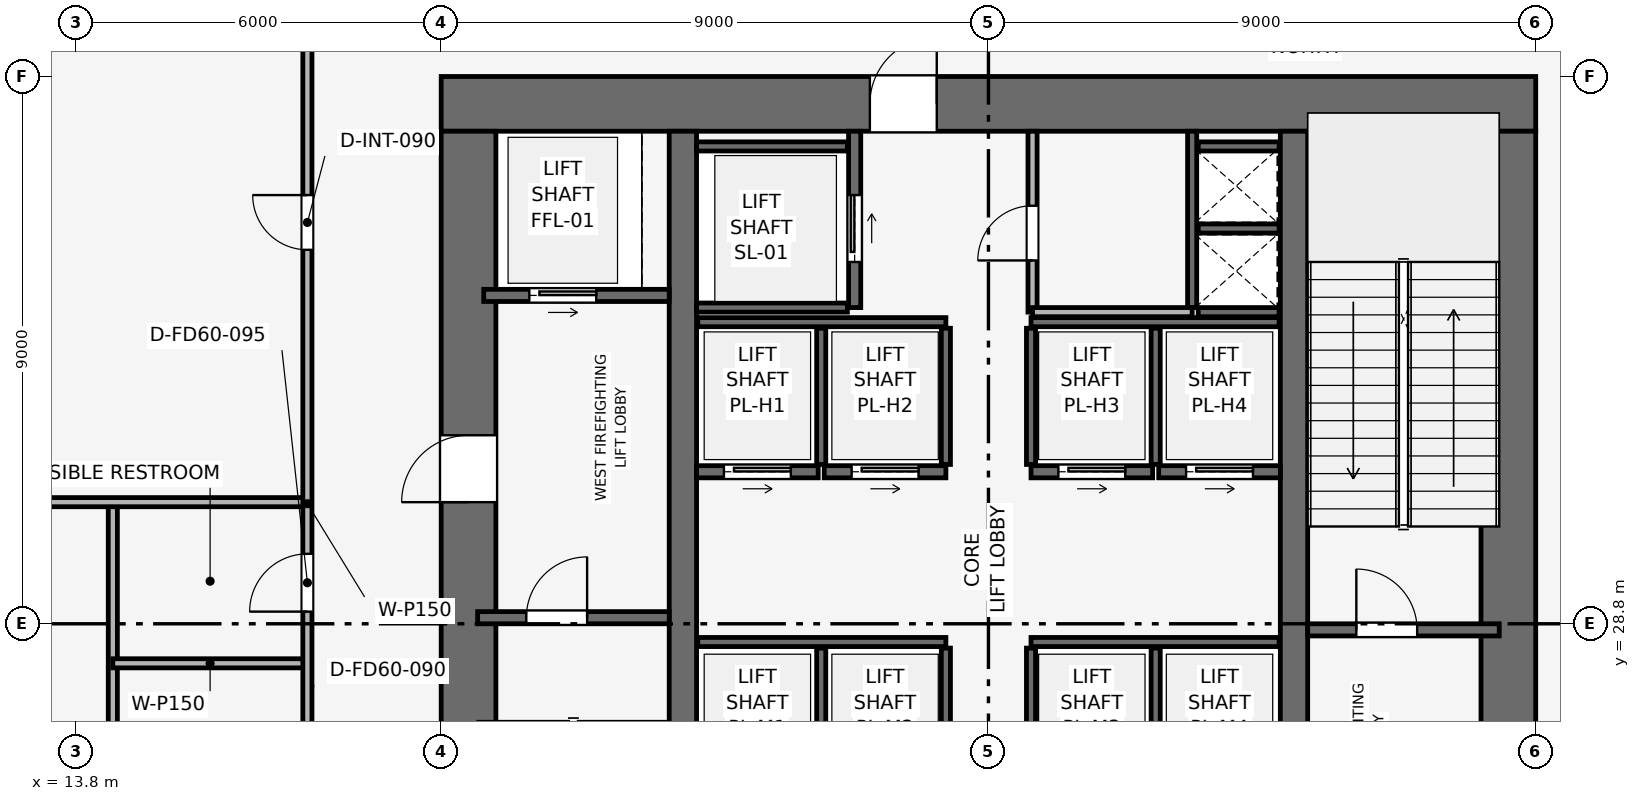
"""IFC4 building model, lengths in metres.
Left out: names, types, materials, properties, quantities, classifications, styles, units other than length and angle.
Written with IfcOpenShell. Run it as: python <this file> out.ifc"""

import sys

from ifc_helpers import new_model, si_unit, direction, frame, frame_2d, origin, place, context, subcontext, project, spatial, rectangle, extrude, element, fill, save


model = new_model("IFC4")
c1 = context("Model", 3, precision=1e-05, world=origin(), true_north=direction((0.0, 1.0)))
c2 = subcontext(c1, "Body", "Model", "MODEL_VIEW")
j1 = project(units=[si_unit("LENGTHUNIT", "METRE"), si_unit("PLANEANGLEUNIT", "RADIAN")], contexts=[c1])
p1 = place(None, origin())
s1 = spatial("IfcSite", under=j1, at=p1, CompositionType="ELEMENT")
p2 = place(p1, origin())
s2 = spatial("IfcBuilding", under=s1, at=p2, CompositionType="ELEMENT")
p3 = place(p2, frame((0.0, 0.0, 132.9)))
s3 = spatial("IfcBuildingStorey", under=s2, at=p3, CompositionType="ELEMENT", Elevation=132.9)
p4 = place(p3, frame((19.8, 37.35, 0.0), z_axis=(0.0, 0.0, 1.0), x_axis=(1.0, 0.0, 0.0)))
e1 = element("IfcWall", 1, at=p4, inside=s3, PredefinedType="SHEAR", context=c2, shape_type="SweptSolid", body=[
    extrude(rectangle(XDim=18.0, YDim=0.9, at=frame_2d((9.0, 0.0))), origin(), (0.0, 0.0, 1.0), 5.4),
])
p5 = place(p4, frame((7.05, 0.0, 0.0)))
e2 = element("IfcOpeningElement", 2, at=p5, cuts=e1, PredefinedType="OPENING", context=c2, shape_type="SweptSolid", body=[
    extrude(rectangle(XDim=1.1, YDim=2.15, at=frame_2d((0.55, 1.075))), frame((0.0, 0.46, 0.0), z_axis=(0.0, -1.0, 0.0), x_axis=(1.0, 0.0, 0.0)), (0.0, 0.0, 1.0), 0.92),
])
p6 = place(p3, frame((20.25, 20.7, 0.0), z_axis=(0.0, 0.0, 1.0), x_axis=(0.0, 1.0, 0.0)))
e3 = element("IfcWall", 3, at=p6, inside=s3, PredefinedType="SHEAR", context=c2, shape_type="SweptSolid", body=[
    extrude(rectangle(XDim=16.2, YDim=0.9, at=frame_2d((8.1, 0.0))), origin(), (0.0, 0.0, 1.0), 5.4),
])
p7 = place(p6, frame((10.1, 0.0, 0.0)))
e4 = element("IfcOpeningElement", 4, at=p7, cuts=e3, PredefinedType="OPENING", context=c2, shape_type="SweptSolid", body=[
    extrude(rectangle(XDim=1.1, YDim=2.15, at=frame_2d((0.55, 1.075))), frame((0.0, 0.46, 0.0), z_axis=(0.0, -1.0, 0.0), x_axis=(1.0, 0.0, 0.0)), (0.0, 0.0, 1.0), 0.92),
])
p8 = place(p3, frame((37.35, 20.7, 0.0), z_axis=(0.0, 0.0, 1.0), x_axis=(0.0, 1.0, 0.0)))
e5 = element("IfcWall", 5, at=p8, inside=s3, PredefinedType="SHEAR", context=c2, shape_type="SweptSolid", body=[
    extrude(rectangle(XDim=16.2, YDim=0.9, at=frame_2d((8.1, 0.0))), origin(), (0.0, 0.0, 1.0), 5.4),
])
p9 = place(p8, frame((4.6, 0.0, 0.0)))
e6 = element("IfcOpeningElement", 6, at=p9, cuts=e5, PredefinedType="OPENING", context=c2, shape_type="SweptSolid", body=[
    extrude(rectangle(XDim=1.1, YDim=2.15, at=frame_2d((0.55, 1.075))), frame((0.0, 0.46, 0.0), z_axis=(0.0, -1.0, 0.0), x_axis=(1.0, 0.0, 0.0)), (0.0, 0.0, 1.0), 0.92),
])
for number, where, z_axis, x_axis in (
    (7, (23.775, 20.7, 0.0), (0.0, 0.0, 1.0), (0.0, 1.0, 0.0)),
    (8, (33.825, 20.7, 0.0), (0.0, 0.0, 1.0), (0.0, 1.0, 0.0)),
):
    element("IfcWall", number, at=place(p3, frame(where, z_axis=z_axis, x_axis=x_axis)), inside=s3, PredefinedType="SHEAR", context=c2, shape_type="SweptSolid", body=[
        extrude(rectangle(XDim=16.2, YDim=0.45, at=frame_2d((8.1, 0.0))), origin(), (0.0, 0.0, 1.0), 5.4),
    ])
p10 = place(p3, frame((20.4, 28.9, 0.0), z_axis=(0.0, 0.0, 1.0), x_axis=(1.0, 0.0, 0.0)))
e9 = element("IfcWall", 9, at=p10, inside=s3, PredefinedType="SHEAR", context=c2, shape_type="SweptSolid", body=[
    extrude(rectangle(XDim=3.15, YDim=0.2, at=frame_2d((1.575, 0.0))), origin(), (0.0, 0.0, 1.0), 5.145),
])
p11 = place(p10, frame((0.8, 0.0, 0.0)))
e10 = element("IfcOpeningElement", 10, at=p11, cuts=e9, PredefinedType="OPENING", context=c2, shape_type="SweptSolid", body=[
    extrude(rectangle(XDim=1.0, YDim=2.1, at=frame_2d((0.5, 1.05))), frame((0.0, 0.11, 0.0), z_axis=(0.0, -1.0, 0.0), x_axis=(1.0, 0.0, 0.0)), (0.0, 0.0, 1.0), 0.22),
])
p12 = place(p3, frame((34.05, 28.7, 0.0), z_axis=(0.0, 0.0, 1.0), x_axis=(1.0, 0.0, 0.0)))
e11 = element("IfcWall", 11, at=p12, inside=s3, PredefinedType="SHEAR", context=c2, shape_type="SweptSolid", body=[
    extrude(rectangle(XDim=3.15, YDim=0.2, at=frame_2d((1.575, 0.0))), origin(), (0.0, 0.0, 1.0), 5.145),
])
p13 = place(p12, frame((0.8, 0.0, 0.0)))
e12 = element("IfcOpeningElement", 12, at=p13, cuts=e11, PredefinedType="OPENING", context=c2, shape_type="SweptSolid", body=[
    extrude(rectangle(XDim=1.0, YDim=2.1, at=frame_2d((0.5, 1.05))), frame((0.0, 0.11, 0.0), z_axis=(0.0, -1.0, 0.0), x_axis=(1.0, 0.0, 0.0)), (0.0, 0.0, 1.0), 0.22),
])
p14 = place(p3, frame((32.15, 34.0, 0.0), z_axis=(0.0, 0.0, 1.0), x_axis=(0.0, 1.0, 0.0)))
e13 = element("IfcWall", 13, at=p14, inside=s3, PredefinedType="SHEAR", context=c2, shape_type="SweptSolid", body=[
    extrude(rectangle(XDim=2.9, YDim=0.15, at=frame_2d((1.45, 0.0))), origin(), (0.0, 0.0, 1.0), 5.145),
])
for number, where, z_axis, x_axis in (
    (14, (32.25, 33.925, 0.0), (0.0, 0.0, 1.0), (1.0, 0.0, 0.0)),
    (15, (32.25, 35.3, 0.0), (0.0, 0.0, 1.0), (1.0, 0.0, 0.0)),
):
    element("IfcWall", number, at=place(p3, frame(where, z_axis=z_axis, x_axis=x_axis)), inside=s3, PredefinedType="SHEAR", context=c2, shape_type="SweptSolid", body=[
        extrude(rectangle(XDim=1.33, YDim=0.15, at=frame_2d((0.665, 0.0))), origin(), (0.0, 0.0, 1.0), 5.145),
    ])
p15 = place(p3, frame((20.5, 34.2, 0.0), z_axis=(0.0, 0.0, 1.0), x_axis=(1.0, 0.0, 0.0)))
e16 = element("IfcWall", 16, at=p15, inside=s3, PredefinedType="SHEAR", context=c2, shape_type="SweptSolid", body=[
    extrude(rectangle(XDim=3.05, YDim=0.2, at=frame_2d((1.525, 0.0))), origin(), (0.0, 0.0, 1.0), 5.145),
])
p16 = place(p15, frame((0.75, 0.0, 0.0)))
e17 = element("IfcOpeningElement", 17, at=p16, cuts=e16, PredefinedType="OPENING", context=c2, shape_type="SweptSolid", body=[
    extrude(rectangle(XDim=1.1, YDim=2.15, at=frame_2d((0.55, 1.075))), frame((0.0, 0.11, 0.0), z_axis=(0.0, -1.0, 0.0), x_axis=(1.0, 0.0, 0.0)), (0.0, 0.0, 1.0), 0.22),
])
p17 = place(p3, frame((26.6, 34.0, 0.0), z_axis=(0.0, 0.0, 1.0), x_axis=(0.0, 1.0, 0.0)))
e18 = element("IfcWall", 18, at=p17, inside=s3, PredefinedType="SHEAR", context=c2, shape_type="SweptSolid", body=[
    extrude(rectangle(XDim=2.9, YDim=0.2, at=frame_2d((1.45, 0.0))), origin(), (0.0, 0.0, 1.0), 5.145),
])
p18 = place(p17, frame((0.75, 0.0, 0.0)))
e19 = element("IfcOpeningElement", 19, at=p18, cuts=e18, PredefinedType="OPENING", context=c2, shape_type="SweptSolid", body=[
    extrude(rectangle(XDim=1.1, YDim=2.15, at=frame_2d((0.55, 1.075))), frame((0.0, 0.11, 0.0), z_axis=(0.0, -1.0, 0.0), x_axis=(1.0, 0.0, 0.0)), (0.0, 0.0, 1.0), 0.22),
])
for number, where, z_axis, x_axis in (
    (20, (24.0, 34.0, 0.0), (0.0, 0.0, 1.0), (1.0, 0.0, 0.0)),
    (21, (24.0, 36.65, 0.0), (0.0, 0.0, 1.0), (1.0, 0.0, 0.0)),
):
    element("IfcWall", number, at=place(p3, frame(where, z_axis=z_axis, x_axis=x_axis)), inside=s3, PredefinedType="SHEAR", context=c2, shape_type="SweptSolid", body=[
        extrude(rectangle(XDim=2.48, YDim=0.15, at=frame_2d((1.24, 0.0))), origin(), (0.0, 0.0, 1.0), 5.145),
    ])
p19 = place(p3, frame((24.0, 31.3, 0.0), z_axis=(0.0, 0.0, 1.0), x_axis=(1.0, 0.0, 0.0)))
e22 = element("IfcWall", 22, at=p19, inside=s3, PredefinedType="SHEAR", context=c2, shape_type="SweptSolid", body=[
    extrude(rectangle(XDim=2.0, YDim=0.2, at=frame_2d((1.0, 0.0))), origin(), (0.0, 0.0, 1.0), 5.145),
])
p20 = place(p19, frame((0.45, 0.0, 0.0)))
e23 = element("IfcOpeningElement", 23, at=p20, cuts=e22, PredefinedType="OPENING", context=c2, shape_type="SweptSolid", body=[
    extrude(rectangle(XDim=1.1, YDim=2.15, at=frame_2d((0.55, 1.075))), frame((0.0, 0.11, 0.0), z_axis=(0.0, -1.0, 0.0), x_axis=(1.0, 0.0, 0.0)), (0.0, 0.0, 1.0), 0.22),
])
p21 = place(p3, frame((26.1, 31.3, 0.0), z_axis=(0.0, 0.0, 1.0), x_axis=(1.0, 0.0, 0.0)))
e24 = element("IfcWall", 24, at=p21, inside=s3, PredefinedType="SHEAR", context=c2, shape_type="SweptSolid", body=[
    extrude(rectangle(XDim=2.0, YDim=0.2, at=frame_2d((1.0, 0.0))), origin(), (0.0, 0.0, 1.0), 5.145),
])
p22 = place(p21, frame((0.45, 0.0, 0.0)))
e25 = element("IfcOpeningElement", 25, at=p22, cuts=e24, PredefinedType="OPENING", context=c2, shape_type="SweptSolid", body=[
    extrude(rectangle(XDim=1.1, YDim=2.15, at=frame_2d((0.55, 1.075))), frame((0.0, 0.11, 0.0), z_axis=(0.0, -1.0, 0.0), x_axis=(1.0, 0.0, 0.0)), (0.0, 0.0, 1.0), 0.22),
])
p23 = place(p3, frame((29.5, 31.3, 0.0), z_axis=(0.0, 0.0, 1.0), x_axis=(1.0, 0.0, 0.0)))
e26 = element("IfcWall", 26, at=p23, inside=s3, PredefinedType="SHEAR", context=c2, shape_type="SweptSolid", body=[
    extrude(rectangle(XDim=2.0, YDim=0.2, at=frame_2d((1.0, 0.0))), origin(), (0.0, 0.0, 1.0), 5.145),
])
p24 = place(p23, frame((0.45, 0.0, 0.0)))
e27 = element("IfcOpeningElement", 27, at=p24, cuts=e26, PredefinedType="OPENING", context=c2, shape_type="SweptSolid", body=[
    extrude(rectangle(XDim=1.1, YDim=2.15, at=frame_2d((0.55, 1.075))), frame((0.0, 0.11, 0.0), z_axis=(0.0, -1.0, 0.0), x_axis=(1.0, 0.0, 0.0)), (0.0, 0.0, 1.0), 0.22),
])
p25 = place(p3, frame((31.6, 31.3, 0.0), z_axis=(0.0, 0.0, 1.0), x_axis=(1.0, 0.0, 0.0)))
e28 = element("IfcWall", 28, at=p25, inside=s3, PredefinedType="SHEAR", context=c2, shape_type="SweptSolid", body=[
    extrude(rectangle(XDim=2.0, YDim=0.2, at=frame_2d((1.0, 0.0))), origin(), (0.0, 0.0, 1.0), 5.145),
])
p26 = place(p25, frame((0.45, 0.0, 0.0)))
e29 = element("IfcOpeningElement", 29, at=p26, cuts=e28, PredefinedType="OPENING", context=c2, shape_type="SweptSolid", body=[
    extrude(rectangle(XDim=1.1, YDim=2.15, at=frame_2d((0.55, 1.075))), frame((0.0, 0.11, 0.0), z_axis=(0.0, -1.0, 0.0), x_axis=(1.0, 0.0, 0.0)), (0.0, 0.0, 1.0), 0.22),
])
p27 = place(p3, frame((32.25, 36.65, 0.0), z_axis=(0.0, 0.0, 1.0), x_axis=(1.0, 0.0, 0.0)))
e30 = element("IfcWall", 30, at=p27, inside=s3, PredefinedType="SHEAR", context=c2, shape_type="SweptSolid", body=[
    extrude(rectangle(XDim=1.33, YDim=0.15, at=frame_2d((0.665, 0.0))), origin(), (0.0, 0.0, 1.0), 5.145),
])
for number, where, z_axis, x_axis in (
    (31, (24.02, 28.5, 0.0), (0.0, 0.0, 1.0), (1.0, 0.0, 0.0)),
    (32, (29.5, 28.5, 0.0), (0.0, 0.0, 1.0), (1.0, 0.0, 0.0)),
):
    element("IfcWall", number, at=place(p3, frame(where, z_axis=z_axis, x_axis=x_axis)), inside=s3, PredefinedType="SHEAR", context=c2, shape_type="SweptSolid", body=[
        extrude(rectangle(XDim=4.08, YDim=0.15, at=frame_2d((2.04, 0.0))), origin(), (0.0, 0.0, 1.0), 5.145),
    ])
for number, where, z_axis, x_axis in (
    (33, (26.05, 26.12, 0.0), (0.0, 0.0, 1.0), (0.0, 1.0, 0.0)),
    (34, (28.1, 26.12, 0.0), (0.0, 0.0, 1.0), (0.0, 1.0, 0.0)),
    (35, (29.5, 26.12, 0.0), (0.0, 0.0, 1.0), (0.0, 1.0, 0.0)),
    (36, (31.55, 26.12, 0.0), (0.0, 0.0, 1.0), (0.0, 1.0, 0.0)),
):
    element("IfcWall", number, at=place(p3, frame(where, z_axis=z_axis, x_axis=x_axis)), inside=s3, PredefinedType="SHEAR", context=c2, shape_type="SweptSolid", body=[
        extrude(rectangle(XDim=2.28, YDim=0.15, at=frame_2d((1.14, 0.0))), origin(), (0.0, 0.0, 1.0), 5.145),
    ])
for number, where, z_axis, x_axis in (
    (37, (24.02, 33.76, 0.0), (0.0, 0.0, 1.0), (1.0, 0.0, 0.0)),
    (38, (29.5, 33.76, 0.0), (0.0, 0.0, 1.0), (1.0, 0.0, 0.0)),
):
    element("IfcWall", number, at=place(p3, frame(where, z_axis=z_axis, x_axis=x_axis)), inside=s3, PredefinedType="SHEAR", context=c2, shape_type="SweptSolid", body=[
        extrude(rectangle(XDim=4.08, YDim=0.15, at=frame_2d((2.04, 0.0))), origin(), (0.0, 0.0, 1.0), 5.145),
    ])
for number, where, z_axis, x_axis in (
    (39, (26.05, 31.42, 0.0), (0.0, 0.0, 1.0), (0.0, 1.0, 0.0)),
    (40, (28.1, 31.42, 0.0), (0.0, 0.0, 1.0), (0.0, 1.0, 0.0)),
    (41, (29.5, 31.42, 0.0), (0.0, 0.0, 1.0), (0.0, 1.0, 0.0)),
    (42, (31.55, 31.42, 0.0), (0.0, 0.0, 1.0), (0.0, 1.0, 0.0)),
):
    element("IfcWall", number, at=place(p3, frame(where, z_axis=z_axis, x_axis=x_axis)), inside=s3, PredefinedType="SHEAR", context=c2, shape_type="SweptSolid", body=[
        extrude(rectangle(XDim=2.24, YDim=0.15, at=frame_2d((1.12, 0.0))), origin(), (0.0, 0.0, 1.0), 5.145),
    ])
p28 = place(p3, frame((29.525, 33.925, 0.0), z_axis=(0.0, 0.0, 1.0), x_axis=(0.0, 1.0, 0.0)))
e43 = element("IfcWall", 43, at=p28, inside=s3, PredefinedType="PARTITIONING", context=c2, shape_type="SweptSolid", body=[
    extrude(rectangle(XDim=2.975, YDim=0.15, at=frame_2d((1.487, 0.0))), origin(), (0.0, 0.0, 1.0), 5.145),
])
p29 = place(p28, frame((0.85, 0.0, 0.0)))
e44 = element("IfcOpeningElement", 44, at=p29, cuts=e43, PredefinedType="OPENING", context=c2, shape_type="SweptSolid", body=[
    extrude(rectangle(XDim=0.9, YDim=2.1, at=frame_2d((0.45, 1.05))), frame((0.0, 0.085, 0.0), z_axis=(0.0, -1.0, 0.0), x_axis=(1.0, 0.0, 0.0)), (0.0, 0.0, 1.0), 0.17),
])
p30 = place(p3, frame((29.525, 33.925, 0.0), z_axis=(0.0, 0.0, 1.0), x_axis=(1.0, 0.0, 0.0)))
e45 = element("IfcWall", 45, at=p30, inside=s3, PredefinedType="PARTITIONING", context=c2, shape_type="SweptSolid", body=[
    extrude(rectangle(XDim=2.625, YDim=0.15, at=frame_2d((1.312, 0.0))), origin(), (0.0, 0.0, 1.0), 5.145),
])
p31 = place(p3, frame((14.4, 22.4, 0.0), z_axis=(0.0, 0.0, 1.0), x_axis=(0.0, 1.0, 0.0)))
e46 = element("IfcWall", 46, at=p31, inside=s3, PredefinedType="PARTITIONING", context=c2, shape_type="SweptSolid", body=[
    extrude(rectangle(XDim=8.4, YDim=0.15, at=frame_2d((4.2, 0.0))), origin(), (0.0, 0.0, 1.0), 4.68),
])
p32 = place(p3, frame((2.83, 30.8, 0.0), z_axis=(0.0, 0.0, 1.0), x_axis=(1.0, 0.0, 0.0)))
e47 = element("IfcWall", 47, at=p32, inside=s3, PredefinedType="PARTITIONING", context=c2, shape_type="SweptSolid", body=[
    extrude(rectangle(XDim=14.77, YDim=0.15, at=frame_2d((7.385, 0.0))), origin(), (0.0, 0.0, 1.0), 4.63),
])
p33 = place(p3, frame((14.4, 28.15, 0.0), z_axis=(0.0, 0.0, 1.0), x_axis=(1.0, 0.0, 0.0)))
e48 = element("IfcWall", 48, at=p33, inside=s3, PredefinedType="PARTITIONING", context=c2, shape_type="SweptSolid", body=[
    extrude(rectangle(XDim=3.2, YDim=0.15, at=frame_2d((1.6, 0.0))), origin(), (0.0, 0.0, 1.0), 4.77),
])
p34 = place(p3, frame((17.6, 17.6, 0.0), z_axis=(0.0, 0.0, 1.0), x_axis=(0.0, 1.0, 0.0)))
e49 = element("IfcWall", 49, at=p34, inside=s3, PredefinedType="PARTITIONING", context=c2, shape_type="SweptSolid", body=[
    extrude(rectangle(XDim=22.4, YDim=0.15, at=frame_2d((11.2, 0.0))), origin(), (0.0, 0.0, 1.0), 4.68),
])
p35 = place(p34, frame((1.95, 0.0, 0.0)))
e50 = element("IfcOpeningElement", 50, at=p35, cuts=e49, PredefinedType="OPENING", context=c2, shape_type="SweptSolid", body=[
    extrude(rectangle(XDim=0.9, YDim=2.1, at=frame_2d((0.45, 1.05))), frame((0.0, 0.085, 0.0), z_axis=(0.0, -1.0, 0.0), x_axis=(1.0, 0.0, 0.0)), (0.0, 0.0, 1.0), 0.17),
])
p36 = place(p34, frame((5.75, 0.0, 0.0)))
e51 = element("IfcOpeningElement", 51, at=p36, cuts=e49, PredefinedType="OPENING", context=c2, shape_type="SweptSolid", body=[
    extrude(rectangle(XDim=0.9, YDim=2.1, at=frame_2d((0.45, 1.05))), frame((0.0, 0.085, 0.0), z_axis=(0.0, -1.0, 0.0), x_axis=(1.0, 0.0, 0.0)), (0.0, 0.0, 1.0), 0.17),
])
p37 = place(p34, frame((8.65, 0.0, 0.0)))
e52 = element("IfcOpeningElement", 52, at=p37, cuts=e49, PredefinedType="OPENING", context=c2, shape_type="SweptSolid", body=[
    extrude(rectangle(XDim=0.9, YDim=2.1, at=frame_2d((0.45, 1.05))), frame((0.0, 0.085, 0.0), z_axis=(0.0, -1.0, 0.0), x_axis=(1.0, 0.0, 0.0)), (0.0, 0.0, 1.0), 0.17),
])
p38 = place(p34, frame((11.4, 0.0, 0.0)))
e53 = element("IfcOpeningElement", 53, at=p38, cuts=e49, PredefinedType="OPENING", context=c2, shape_type="SweptSolid", body=[
    extrude(rectangle(XDim=0.95, YDim=2.1, at=frame_2d((0.475, 1.05))), frame((0.0, 0.085, 0.0), z_axis=(0.0, -1.0, 0.0), x_axis=(1.0, 0.0, 0.0)), (0.0, 0.0, 1.0), 0.17),
])
p39 = place(p34, frame((17.35, 0.0, 0.0)))
e54 = element("IfcOpeningElement", 54, at=p39, cuts=e49, PredefinedType="OPENING", context=c2, shape_type="SweptSolid", body=[
    extrude(rectangle(XDim=0.9, YDim=2.1, at=frame_2d((0.45, 1.05))), frame((0.0, 0.085, 0.0), z_axis=(0.0, -1.0, 0.0), x_axis=(1.0, 0.0, 0.0)), (0.0, 0.0, 1.0), 0.17),
])
p40 = place(p11, origin())
e55 = element("IfcDoor", 55, at=p40, inside=s3, OperationType="SINGLE_SWING_RIGHT", PredefinedType="DOOR", context=c2, shape_type="SweptSolid", body=[
    extrude(rectangle(XDim=1.0, YDim=2.1, at=frame_2d((0.5, 1.05))), frame((0.0, 0.025, 0.0), z_axis=(0.0, -1.0, 0.0), x_axis=(1.0, 0.0, 0.0)), (0.0, 0.0, 1.0), 0.05),
])
fill(e10, e55)
p41 = place(p13, origin())
e56 = element("IfcDoor", 56, at=p41, inside=s3, OperationType="SINGLE_SWING_LEFT", PredefinedType="DOOR", context=c2, shape_type="SweptSolid", body=[
    extrude(rectangle(XDim=1.0, YDim=2.1, at=frame_2d((0.5, 1.05))), frame((0.0, 0.025, 0.0), z_axis=(0.0, -1.0, 0.0), x_axis=(1.0, 0.0, 0.0)), (0.0, 0.0, 1.0), 0.05),
])
fill(e12, e56)
p42 = place(p16, origin())
e57 = element("IfcDoor", 57, at=p42, inside=s3, OperationType="SLIDING_TO_RIGHT", PredefinedType="DOOR", context=c2, shape_type="SweptSolid", body=[
    extrude(rectangle(XDim=1.1, YDim=2.15, at=frame_2d((0.55, 1.075))), frame((0.0, 0.025, 0.0), z_axis=(0.0, -1.0, 0.0), x_axis=(1.0, 0.0, 0.0)), (0.0, 0.0, 1.0), 0.05),
])
fill(e17, e57)
p43 = place(p18, origin())
e58 = element("IfcDoor", 58, at=p43, inside=s3, OperationType="SLIDING_TO_RIGHT", PredefinedType="DOOR", context=c2, shape_type="SweptSolid", body=[
    extrude(rectangle(XDim=1.1, YDim=2.15, at=frame_2d((0.55, 1.075))), frame((0.0, 0.025, 0.0), z_axis=(0.0, -1.0, 0.0), x_axis=(1.0, 0.0, 0.0)), (0.0, 0.0, 1.0), 0.05),
])
fill(e19, e58)
p44 = place(p20, origin())
e59 = element("IfcDoor", 59, at=p44, inside=s3, OperationType="SLIDING_TO_RIGHT", PredefinedType="DOOR", context=c2, shape_type="SweptSolid", body=[
    extrude(rectangle(XDim=1.1, YDim=2.15, at=frame_2d((0.55, 1.075))), frame((0.0, 0.025, 0.0), z_axis=(0.0, -1.0, 0.0), x_axis=(1.0, 0.0, 0.0)), (0.0, 0.0, 1.0), 0.05),
])
fill(e23, e59)
p45 = place(p22, origin())
e60 = element("IfcDoor", 60, at=p45, inside=s3, OperationType="SLIDING_TO_RIGHT", PredefinedType="DOOR", context=c2, shape_type="SweptSolid", body=[
    extrude(rectangle(XDim=1.1, YDim=2.15, at=frame_2d((0.55, 1.075))), frame((0.0, 0.025, 0.0), z_axis=(0.0, -1.0, 0.0), x_axis=(1.0, 0.0, 0.0)), (0.0, 0.0, 1.0), 0.05),
])
fill(e25, e60)
p46 = place(p24, origin())
e61 = element("IfcDoor", 61, at=p46, inside=s3, OperationType="SLIDING_TO_RIGHT", PredefinedType="DOOR", context=c2, shape_type="SweptSolid", body=[
    extrude(rectangle(XDim=1.1, YDim=2.15, at=frame_2d((0.55, 1.075))), frame((0.0, 0.025, 0.0), z_axis=(0.0, -1.0, 0.0), x_axis=(1.0, 0.0, 0.0)), (0.0, 0.0, 1.0), 0.05),
])
fill(e27, e61)
p47 = place(p26, origin())
e62 = element("IfcDoor", 62, at=p47, inside=s3, OperationType="SLIDING_TO_RIGHT", PredefinedType="DOOR", context=c2, shape_type="SweptSolid", body=[
    extrude(rectangle(XDim=1.1, YDim=2.15, at=frame_2d((0.55, 1.075))), frame((0.0, 0.025, 0.0), z_axis=(0.0, -1.0, 0.0), x_axis=(1.0, 0.0, 0.0)), (0.0, 0.0, 1.0), 0.05),
])
fill(e29, e62)
p48 = place(p29, origin())
e63 = element("IfcDoor", 63, at=p48, inside=s3, OperationType="SINGLE_SWING_LEFT", PredefinedType="DOOR", context=c2, shape_type="SweptSolid", body=[
    extrude(rectangle(XDim=0.9, YDim=2.1, at=frame_2d((0.45, 1.05))), frame((0.0, 0.025, 0.0), z_axis=(0.0, -1.0, 0.0), x_axis=(1.0, 0.0, 0.0)), (0.0, 0.0, 1.0), 0.05),
])
fill(e44, e63)
p49 = place(p38, origin())
e64 = element("IfcDoor", 64, at=p49, inside=s3, OperationType="SINGLE_SWING_LEFT", PredefinedType="DOOR", context=c2, shape_type="SweptSolid", body=[
    extrude(rectangle(XDim=0.95, YDim=2.1, at=frame_2d((0.475, 1.05))), frame((0.0, 0.025, 0.0), z_axis=(0.0, -1.0, 0.0), x_axis=(1.0, 0.0, 0.0)), (0.0, 0.0, 1.0), 0.05),
])
fill(e53, e64)
p50 = place(p39, origin())
e65 = element("IfcDoor", 65, at=p50, inside=s3, OperationType="SINGLE_SWING_RIGHT", PredefinedType="DOOR", context=c2, shape_type="SweptSolid", body=[
    extrude(rectangle(XDim=0.9, YDim=2.1, at=frame_2d((0.45, 1.05))), frame((0.0, 0.025, 0.0), z_axis=(0.0, -1.0, 0.0), x_axis=(1.0, 0.0, 0.0)), (0.0, 0.0, 1.0), 0.05),
])
fill(e54, e65)
p51 = place(p7, origin())
e66 = element("IfcDoor", 66, at=p51, inside=s3, OperationType="SINGLE_SWING_LEFT", PredefinedType="DOOR", context=c2, shape_type="SweptSolid", body=[
    extrude(rectangle(XDim=1.1, YDim=2.15, at=frame_2d((0.55, 1.075))), frame((0.0, 0.025, 0.0), z_axis=(0.0, -1.0, 0.0), x_axis=(1.0, 0.0, 0.0)), (0.0, 0.0, 1.0), 0.05),
])
fill(e4, e66)
p52 = place(p5, origin())
e67 = element("IfcDoor", 67, at=p52, inside=s3, OperationType="SINGLE_SWING_RIGHT", PredefinedType="DOOR", context=c2, shape_type="SweptSolid", body=[
    extrude(rectangle(XDim=1.1, YDim=2.15, at=frame_2d((0.55, 1.075))), frame((0.0, 0.025, 0.0), z_axis=(0.0, -1.0, 0.0), x_axis=(1.0, 0.0, 0.0)), (0.0, 0.0, 1.0), 0.05),
])
fill(e2, e67)
save(model, sys.argv[1])
